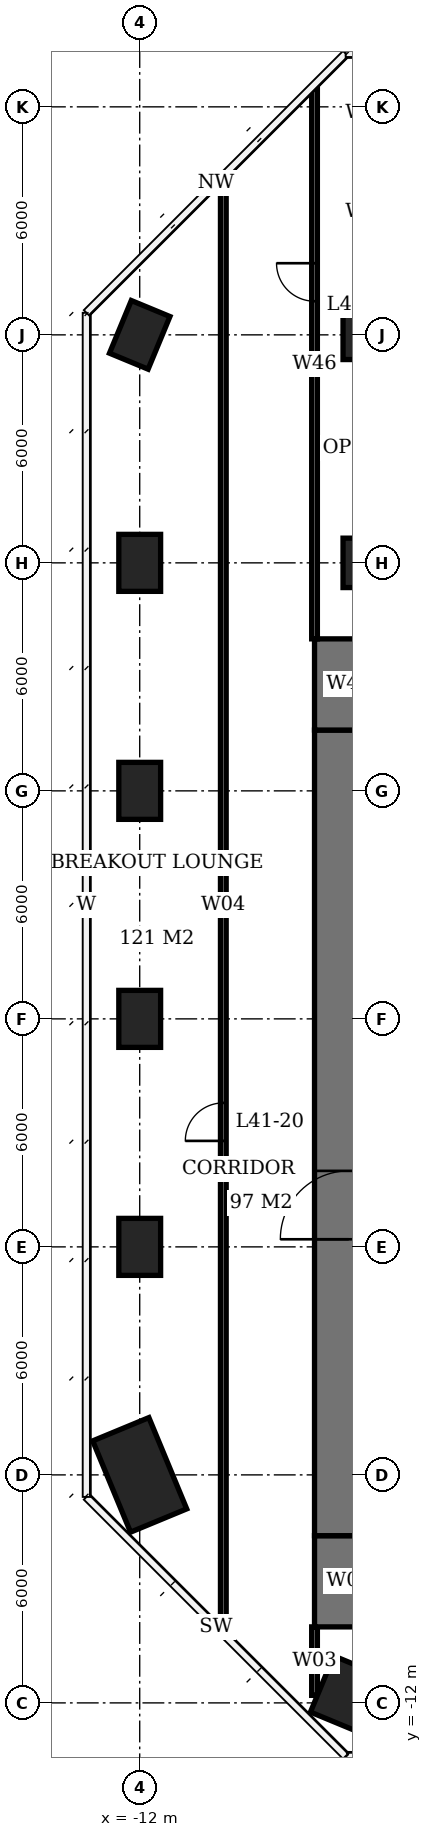
"""IFC4 building model, lengths in metres.
Left out: names, types, materials, properties, quantities, classifications, styles, units other than length and angle.
Written with IfcOpenShell. Run it as: python <this file> out.ifc"""

import sys

from ifc_helpers import new_model, si_unit, direction, frame, frame_2d, origin, origin_2d, place, context, subcontext, project, spatial, rectangle, extrude, element, fill, save


model = new_model("IFC4")
c1 = context("Model", 3, precision=1e-05, world=origin(), true_north=direction((0.0, 1.0)))
c2 = subcontext(c1, "Body", "Model", "MODEL_VIEW")
j1 = project(units=[si_unit("LENGTHUNIT", "METRE"), si_unit("PLANEANGLEUNIT", "RADIAN")], contexts=[c1])
p1 = place(None, origin())
s1 = spatial("IfcSite", under=j1, at=p1, CompositionType="ELEMENT")
p2 = place(p1, origin())
s2 = spatial("IfcBuilding", under=s1, at=p2, CompositionType="ELEMENT")
p3 = place(p2, frame((0.0, 0.0, 169.4)))
s3 = spatial("IfcBuildingStorey", under=s2, at=p3, CompositionType="ELEMENT", Elevation=169.4)
p4 = place(p3, frame((-12.0, -6.0, 0.0), z_axis=(0.0, 0.0, 1.0), x_axis=(-0.382683432365, 0.923879532511, 0.0)))
e1 = element("IfcColumn", 1, at=p4, inside=s3, PredefinedType="COLUMN", context=c2, shape_type="SweptSolid", body=[
    extrude(rectangle(XDim=2.6, YDim=1.6, at=origin_2d()), origin(), (0.0, 0.0, 1.0), 3.9),
])
for number, where, z_axis, x_axis in (
    (2, (-12.0, 0.0, 0.0), (0.0, 0.0, 1.0), (0.0, 1.0, 0.0)),
    (3, (-12.0, 6.0, 0.0), (0.0, 0.0, 1.0), (0.0, 1.0, 0.0)),
    (4, (-12.0, 12.0, 0.0), (0.0, 0.0, 1.0), (0.0, 1.0, 0.0)),
    (5, (-12.0, 18.0, 0.0), (0.0, 0.0, 1.0), (0.0, 1.0, 0.0)),
    (6, (-12.0, 24.0, 0.0), (0.0, 0.0, 1.0), (0.383, 0.924, 0.0)),
):
    element("IfcColumn", number, at=place(p3, frame(where, z_axis=z_axis, x_axis=x_axis)), inside=s3, PredefinedType="COLUMN", context=c2, shape_type="SweptSolid", body=[
        extrude(rectangle(XDim=1.5, YDim=1.1, at=origin_2d()), origin(), (0.0, 0.0, 1.0), 3.9),
    ])
p5 = place(p3, frame((-6.0, -12.0, 0.0), z_axis=(0.0, 0.0, 1.0), x_axis=(-0.923879532511, 0.382683432365, 0.0)))
e7 = element("IfcColumn", 7, at=p5, inside=s3, PredefinedType="COLUMN", context=c2, shape_type="SweptSolid", body=[
    extrude(rectangle(XDim=2.6, YDim=1.6, at=origin_2d()), origin(), (0.0, 0.0, 1.0), 3.9),
])
for number, where, z_axis, x_axis in (
    (8, (-6.0, 18.0, 0.0), (0.0, 0.0, 1.0), (1.0, 0.0, 0.0)),
    (9, (-6.0, 24.0, 0.0), (0.0, 0.0, 1.0), (1.0, 0.0, 0.0)),
):
    element("IfcColumn", number, at=place(p3, frame(where, z_axis=z_axis, x_axis=x_axis)), inside=s3, PredefinedType="COLUMN", context=c2, shape_type="SweptSolid", body=[
        extrude(rectangle(XDim=1.3, YDim=1.3, at=origin_2d()), origin(), (0.0, 0.0, 1.0), 3.9),
    ])
p6 = place(p3, frame((-6.5, -7.6, 0.0), z_axis=(0.0, 0.0, 1.0), x_axis=(0.0, 1.0, 0.0)))
e10 = element("IfcWall", 10, at=p6, inside=s3, PredefinedType="SHEAR", context=c2, shape_type="SweptSolid", body=[
    extrude(rectangle(XDim=21.2, YDim=1.8, at=frame_2d((10.6, 0.0))), origin(), (0.0, 0.0, 1.0), 3.9),
])
p7 = place(p6, frame((7.8, 0.0, 0.0)))
e11 = element("IfcOpeningElement", 11, at=p7, cuts=e10, PredefinedType="OPENING", context=c2, shape_type="SweptSolid", body=[
    extrude(rectangle(XDim=1.8, YDim=2.4, at=frame_2d((0.9, 1.2))), frame((0.0, 0.91, 0.0), z_axis=(0.0, -1.0, 0.0), x_axis=(1.0, 0.0, 0.0)), (0.0, 0.0, 1.0), 1.82),
])
for number, where, z_axis, x_axis in (
    (12, (-6.5, -10.0, 0.0), (0.0, 0.0, 1.0), (0.0, 1.0, 0.0)),
    (13, (-6.5, 13.6, 0.0), (0.0, 0.0, 1.0), (0.0, 1.0, 0.0)),
):
    element("IfcWall", number, at=place(p3, frame(where, z_axis=z_axis, x_axis=x_axis)), inside=s3, PredefinedType="SHEAR", context=c2, shape_type="SweptSolid", body=[
        extrude(rectangle(XDim=2.4, YDim=1.8, at=frame_2d((1.2, 0.0))), origin(), (0.0, 0.0, 1.0), 3.9),
    ])
p8 = place(p3, frame((-9.8, -10.088, 0.0), z_axis=(0.0, 0.0, 1.0), x_axis=(0.0, 1.0, 0.0)))
e14 = element("IfcWall", 14, at=p8, inside=s3, PredefinedType="PARTITIONING", context=c2, shape_type="SweptSolid", body=[
    extrude(rectangle(XDim=38.176, YDim=0.15, at=frame_2d((19.088, 0.0))), origin(), (0.0, 0.0, 1.0), 3.65),
])
p9 = place(p8, frame((12.877, 0.0, 0.0)))
e15 = element("IfcOpeningElement", 15, at=p9, cuts=e14, PredefinedType="OPENING", context=c2, shape_type="SweptSolid", body=[
    extrude(rectangle(XDim=1.0, YDim=2.1, at=frame_2d((0.5, 1.05))), frame((0.0, 0.085, 0.0), z_axis=(0.0, -1.0, 0.0), x_axis=(1.0, 0.0, 0.0)), (0.0, 0.0, 1.0), 0.17),
])
p10 = place(p3, frame((-7.4, -11.802, 0.0), z_axis=(0.0, 0.0, 1.0), x_axis=(0.0, 1.0, 0.0)))
e16 = element("IfcWall", 16, at=p10, inside=s3, PredefinedType="PARTITIONING", context=c2, shape_type="SweptSolid", body=[
    extrude(rectangle(XDim=1.802, YDim=0.15, at=frame_2d((0.901, 0.0))), origin(), (0.0, 0.0, 1.0), 3.65),
])
p11 = place(p3, frame((-7.4, 16.0, 0.0), z_axis=(0.0, 0.0, 1.0), x_axis=(0.0, 1.0, 0.0)))
e17 = element("IfcWall", 17, at=p11, inside=s3, PredefinedType="PARTITIONING", context=c2, shape_type="SweptSolid", body=[
    extrude(rectangle(XDim=14.489, YDim=0.15, at=frame_2d((7.245, 0.0))), origin(), (0.0, 0.0, 1.0), 3.65),
])
p12 = place(p11, frame((8.885, 0.0, 0.0)))
e18 = element("IfcOpeningElement", 18, at=p12, cuts=e17, PredefinedType="OPENING", context=c2, shape_type="SweptSolid", body=[
    extrude(rectangle(XDim=1.0, YDim=2.1, at=frame_2d((0.5, 1.05))), frame((0.0, 0.085, 0.0), z_axis=(0.0, -1.0, 0.0), x_axis=(1.0, 0.0, 0.0)), (0.0, 0.0, 1.0), 0.17),
])
p13 = place(p7, origin())
e19 = element("IfcDoor", 19, at=p13, inside=s3, OperationType="DOUBLE_DOOR_SINGLE_SWING", PredefinedType="DOOR", context=c2, shape_type="SweptSolid", body=[
    extrude(rectangle(XDim=1.8, YDim=2.4, at=frame_2d((0.9, 1.2))), frame((0.0, 0.025, 0.0), z_axis=(0.0, -1.0, 0.0), x_axis=(1.0, 0.0, 0.0)), (0.0, 0.0, 1.0), 0.05),
])
fill(e11, e19)
p14 = place(p9, origin())
e20 = element("IfcDoor", 20, at=p14, inside=s3, OperationType="SINGLE_SWING_LEFT", PredefinedType="DOOR", context=c2, shape_type="SweptSolid", body=[
    extrude(rectangle(XDim=1.0, YDim=2.1, at=frame_2d((0.5, 1.05))), frame((0.0, 0.025, 0.0), z_axis=(0.0, -1.0, 0.0), x_axis=(1.0, 0.0, 0.0)), (0.0, 0.0, 1.0), 0.05),
])
fill(e15, e20)
p15 = place(p12, origin())
e21 = element("IfcDoor", 21, at=p15, inside=s3, OperationType="SINGLE_SWING_RIGHT", PredefinedType="DOOR", context=c2, shape_type="SweptSolid", body=[
    extrude(rectangle(XDim=1.0, YDim=2.1, at=frame_2d((0.5, 1.05))), frame((0.0, 0.025, 0.0), z_axis=(0.0, -1.0, 0.0), x_axis=(1.0, 0.0, 0.0)), (0.0, 0.0, 1.0), 0.05),
])
fill(e18, e21)
save(model, sys.argv[1])
